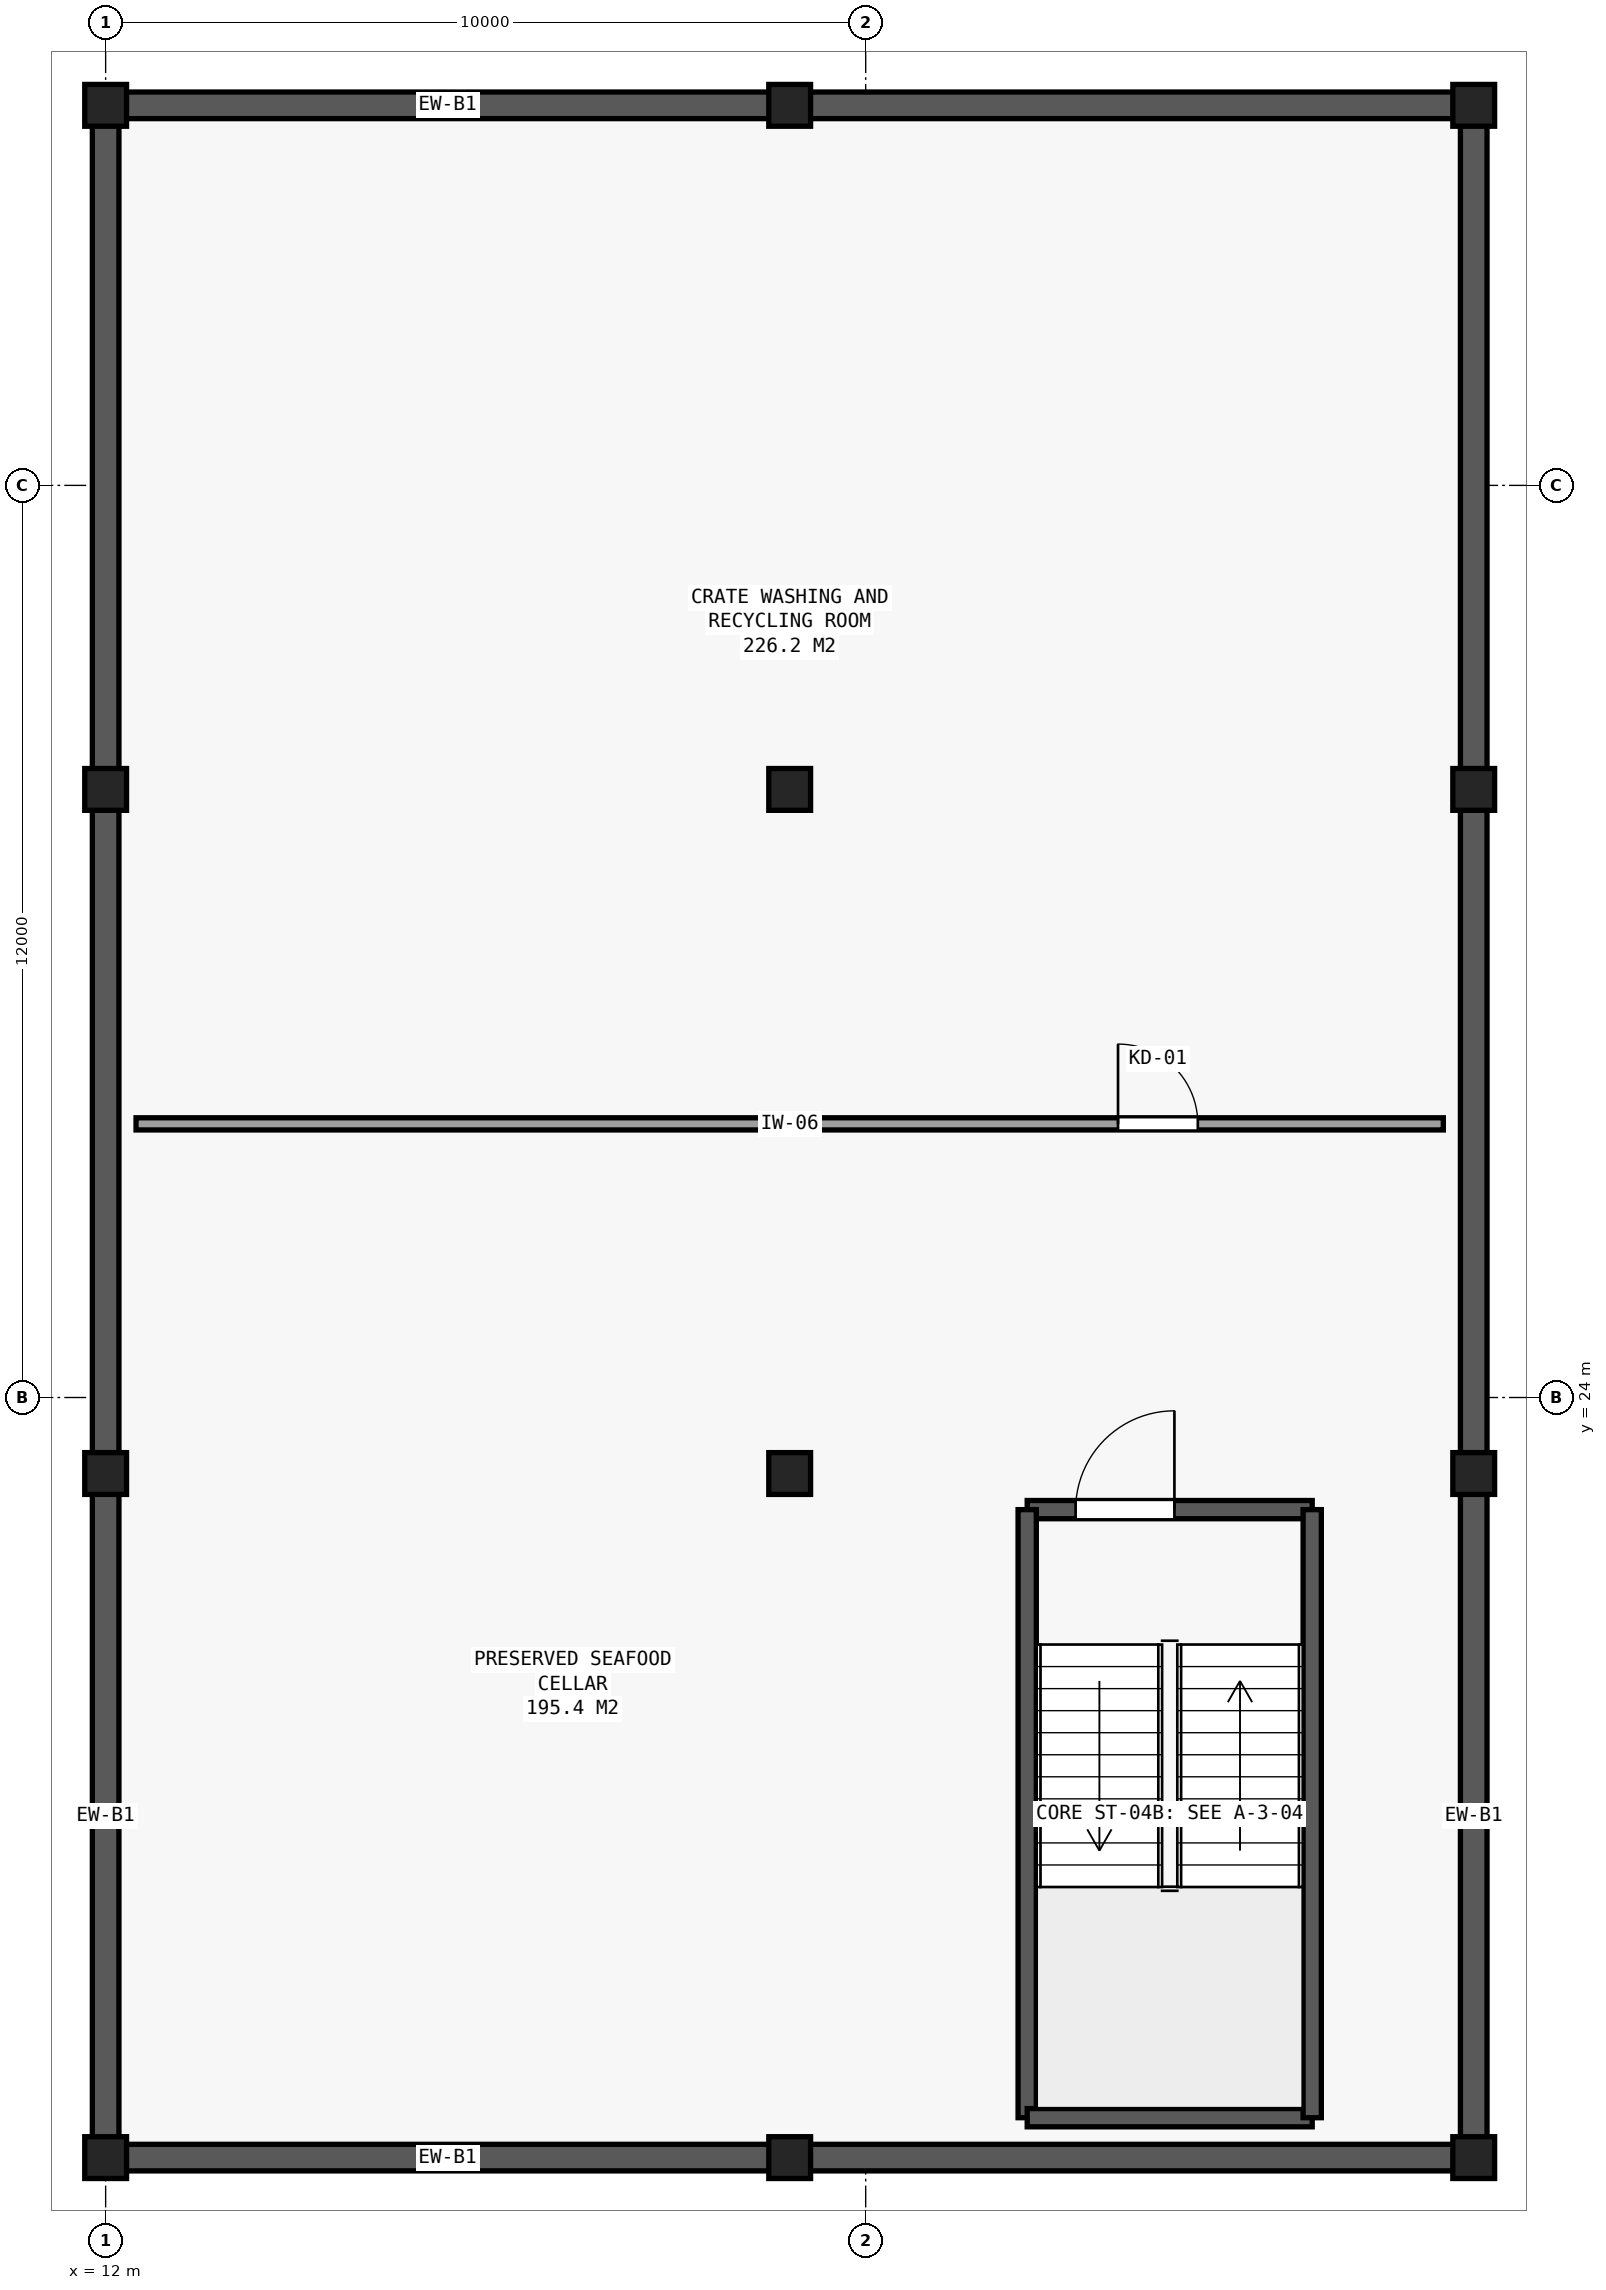
"""IFC4 building model, lengths in metres.
Left out: names, types, materials, properties, quantities, classifications, styles, units other than length and angle.
Written with IfcOpenShell. Run it as: python <this file> out.ifc"""

import sys

from ifc_helpers import new_model, si_unit, direction, frame, frame_2d, origin, origin_2d, place, context, subcontext, project, spatial, rectangle, extrude, element, fill, save


model = new_model("IFC4")
c1 = context("Model", 3, precision=1e-05, world=origin(), true_north=direction((0.0, 1.0)))
c2 = subcontext(c1, "Body", "Model", "MODEL_VIEW")
j1 = project(units=[si_unit("LENGTHUNIT", "METRE"), si_unit("PLANEANGLEUNIT", "RADIAN")], contexts=[c1])
p1 = place(None, origin())
s1 = spatial("IfcSite", under=j1, at=p1, CompositionType="ELEMENT")
p2 = place(p1, origin())
s2 = spatial("IfcBuilding", under=s1, at=p2, CompositionType="ELEMENT")
p3 = place(p2, frame((0.0, 0.0, -4.2)))
s3 = spatial("IfcBuildingStorey", under=s2, at=p3, CompositionType="ELEMENT", Elevation=-4.2)
for number, where, z_axis, x_axis in (
    (1, (12.0, 14.0, -0.4), (0.0, 0.0, 1.0), (1.0, 0.0, 0.0)),
    (2, (12.0, 23.0, -0.4), (0.0, 0.0, 1.0), (1.0, 0.0, 0.0)),
    (3, (12.0, 32.0, -0.4), (0.0, 0.0, 1.0), (1.0, 0.0, 0.0)),
    (4, (12.0, 41.0, -0.4), (0.0, 0.0, 1.0), (1.0, 0.0, 0.0)),
    (5, (21.0, 14.0, -0.4), (0.0, 0.0, 1.0), (1.0, 0.0, 0.0)),
    (6, (21.0, 23.0, -0.4), (0.0, 0.0, 1.0), (1.0, 0.0, 0.0)),
    (7, (21.0, 32.0, -0.4), (0.0, 0.0, 1.0), (1.0, 0.0, 0.0)),
    (8, (21.0, 41.0, -0.4), (0.0, 0.0, 1.0), (1.0, 0.0, 0.0)),
    (9, (30.0, 14.0, -0.4), (0.0, 0.0, 1.0), (1.0, 0.0, 0.0)),
    (10, (30.0, 23.0, -0.4), (0.0, 0.0, 1.0), (1.0, 0.0, 0.0)),
    (11, (30.0, 32.0, -0.4), (0.0, 0.0, 1.0), (1.0, 0.0, 0.0)),
    (12, (30.0, 41.0, -0.4), (0.0, 0.0, 1.0), (1.0, 0.0, 0.0)),
):
    element("IfcColumn", number, at=place(p3, frame(where, z_axis=z_axis, x_axis=x_axis)), inside=s3, PredefinedType="COLUMN", context=c2, shape_type="SweptSolid", body=[
        extrude(rectangle(XDim=0.55, YDim=0.55, at=origin_2d()), origin(), (0.0, 0.0, 1.0), 4.6),
    ])
for number, where, z_axis, x_axis in (
    (13, (12.0, 41.0, 0.0), (0.0, 0.0, 1.0), (1.0, 0.0, 0.0)),
    (14, (21.0, 14.0, 0.0), (0.0, 0.0, 1.0), (-1.0, 0.0, 0.0)),
    (15, (21.0, 41.0, 0.0), (0.0, 0.0, 1.0), (1.0, 0.0, 0.0)),
    (16, (30.0, 14.0, 0.0), (0.0, 0.0, 1.0), (-1.0, 0.0, 0.0)),
    (17, (12.0, 14.0, 0.0), (0.0, 0.0, 1.0), (0.0, 1.0, 0.0)),
    (18, (30.0, 23.0, 0.0), (0.0, 0.0, 1.0), (0.0, -1.0, 0.0)),
    (19, (12.0, 23.0, 0.0), (0.0, 0.0, 1.0), (0.0, 1.0, 0.0)),
    (20, (30.0, 32.0, 0.0), (0.0, 0.0, 1.0), (0.0, -1.0, 0.0)),
    (21, (12.0, 32.0, 0.0), (0.0, 0.0, 1.0), (0.0, 1.0, 0.0)),
    (22, (30.0, 41.0, 0.0), (0.0, 0.0, 1.0), (0.0, -1.0, 0.0)),
):
    element("IfcWall", number, at=place(p3, frame(where, z_axis=z_axis, x_axis=x_axis)), inside=s3, PredefinedType="SOLIDWALL", context=c2, shape_type="SweptSolid", body=[
        extrude(rectangle(XDim=9.0, YDim=0.35, at=frame_2d((4.5, 0.0))), origin(), (0.0, 0.0, 1.0), 3.9),
    ])
p4 = place(p3, frame((24.125, 22.525, 0.0), z_axis=(0.0, 0.0, 1.0), x_axis=(1.0, 0.0, 0.0)))
e23 = element("IfcWall", 23, at=p4, inside=s3, PredefinedType="SOLIDWALL", context=c2, shape_type="SweptSolid", body=[
    extrude(rectangle(XDim=3.75, YDim=0.24, at=frame_2d((1.875, 0.0))), origin(), (0.0, 0.0, 1.0), 3.9),
])
p5 = place(p4, frame((0.637, 0.0, 0.0)))
e24 = element("IfcOpeningElement", 24, at=p5, cuts=e23, PredefinedType="OPENING", context=c2, shape_type="SweptSolid", body=[
    extrude(rectangle(XDim=1.3, YDim=2.15, at=frame_2d((0.65, 1.075))), frame((0.0, 0.13, 0.0), z_axis=(0.0, -1.0, 0.0), x_axis=(1.0, 0.0, 0.0)), (0.0, 0.0, 1.0), 0.26),
])
p6 = place(p3, frame((24.125, 14.525, 0.0), z_axis=(0.0, 0.0, 1.0), x_axis=(0.0, 1.0, 0.0)))
e25 = element("IfcWall", 25, at=p6, inside=s3, PredefinedType="SOLIDWALL", context=c2, shape_type="SweptSolid", body=[
    extrude(rectangle(XDim=8.0, YDim=0.24, at=frame_2d((4.0, 0.0))), origin(), (0.0, 0.0, 1.0), 3.9),
])
p7 = place(p3, frame((27.875, 14.525, 0.0), z_axis=(0.0, 0.0, 1.0), x_axis=(-1.0, 0.0, 0.0)))
e26 = element("IfcWall", 26, at=p7, inside=s3, PredefinedType="SOLIDWALL", context=c2, shape_type="SweptSolid", body=[
    extrude(rectangle(XDim=3.75, YDim=0.24, at=frame_2d((1.875, 0.0))), origin(), (0.0, 0.0, 1.0), 3.9),
])
p8 = place(p3, frame((27.875, 22.525, 0.0), z_axis=(0.0, 0.0, 1.0), x_axis=(0.0, -1.0, 0.0)))
e27 = element("IfcWall", 27, at=p8, inside=s3, PredefinedType="SOLIDWALL", context=c2, shape_type="SweptSolid", body=[
    extrude(rectangle(XDim=8.0, YDim=0.24, at=frame_2d((4.0, 0.0))), origin(), (0.0, 0.0, 1.0), 3.9),
])
p9 = place(p3, frame((12.4, 27.6, 0.0), z_axis=(0.0, 0.0, 1.0), x_axis=(1.0, 0.0, 0.0)))
e28 = element("IfcWall", 28, at=p9, inside=s3, PredefinedType="PARTITIONING", context=c2, shape_type="SweptSolid", body=[
    extrude(rectangle(XDim=17.2, YDim=0.16, at=frame_2d((8.6, 0.0))), origin(), (0.0, 0.0, 1.0), 3.59),
])
p10 = place(p9, frame((12.92, 0.0, 0.0)))
e29 = element("IfcOpeningElement", 29, at=p10, cuts=e28, PredefinedType="OPENING", context=c2, shape_type="SweptSolid", body=[
    extrude(rectangle(XDim=1.05, YDim=2.15, at=frame_2d((0.525, 1.075))), frame((0.0, 0.09, 0.0), z_axis=(0.0, -1.0, 0.0), x_axis=(1.0, 0.0, 0.0)), (0.0, 0.0, 1.0), 0.18),
])
p11 = place(p5, origin())
e30 = element("IfcDoor", 30, at=p11, inside=s3, OperationType="SINGLE_SWING_RIGHT", PredefinedType="DOOR", context=c2, shape_type="SweptSolid", body=[
    extrude(rectangle(XDim=1.3, YDim=2.15, at=frame_2d((0.65, 1.075))), frame((0.0, 0.025, 0.0), z_axis=(0.0, -1.0, 0.0), x_axis=(1.0, 0.0, 0.0)), (0.0, 0.0, 1.0), 0.05),
])
fill(e24, e30)
p12 = place(p10, origin())
e31 = element("IfcDoor", 31, at=p12, inside=s3, OperationType="SINGLE_SWING_LEFT", PredefinedType="DOOR", context=c2, shape_type="SweptSolid", body=[
    extrude(rectangle(XDim=1.05, YDim=2.15, at=frame_2d((0.525, 1.075))), frame((0.0, 0.025, 0.0), z_axis=(0.0, -1.0, 0.0), x_axis=(1.0, 0.0, 0.0)), (0.0, 0.0, 1.0), 0.05),
])
fill(e29, e31)
save(model, sys.argv[1])
